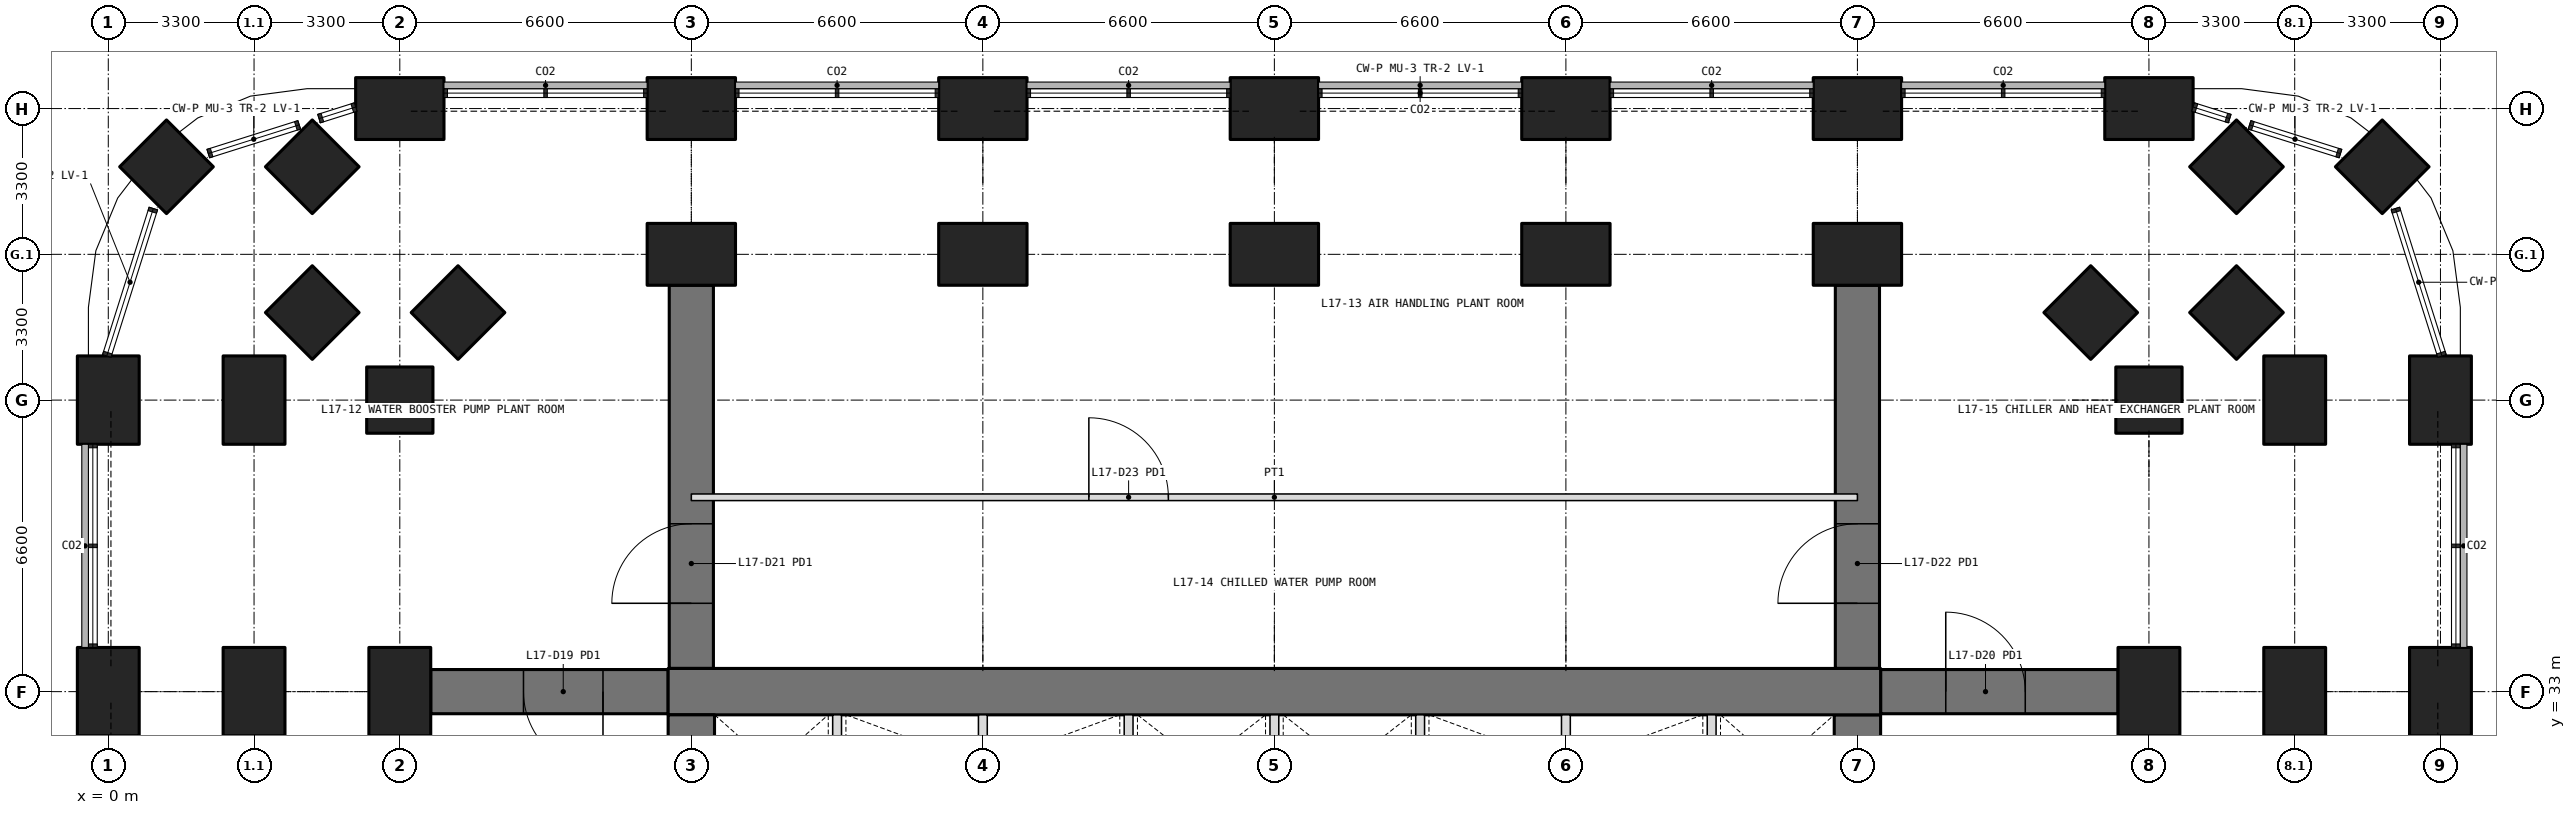
"""IFC4 building model, lengths in metres.
Left out: names, types, materials, properties, quantities, classifications, styles, units other than length and angle.
Written with IfcOpenShell. Run it as: python <this file> out.ifc"""

import sys

from ifc_helpers import new_model, si_unit, direction, frame, frame_2d, origin, origin_2d, place, context, subcontext, project, spatial, rectangle, extrude, element, fill, save


model = new_model("IFC4")
c1 = context("Model", 3, precision=1e-05, world=origin(), true_north=direction((0.0, 1.0)))
c2 = subcontext(c1, "Body", "Model", "MODEL_VIEW")
j1 = project(units=[si_unit("LENGTHUNIT", "METRE"), si_unit("PLANEANGLEUNIT", "RADIAN")], contexts=[c1])
p1 = place(None, origin())
s1 = spatial("IfcSite", under=j1, at=p1, CompositionType="ELEMENT")
p2 = place(p1, origin())
s2 = spatial("IfcBuilding", under=s1, at=p2, CompositionType="ELEMENT")
p3 = place(p2, frame((0.0, 0.0, 75.9)))
s3 = spatial("IfcBuildingStorey", under=s2, at=p3, CompositionType="ELEMENT", Elevation=75.9)
for number, where, z_axis, x_axis in (
    (1, (1.318, 44.882, 0.0), (0.0, 0.0, 1.0), (0.707, 0.707, 0.0)),
    (2, (51.482, 44.882, 0.0), (0.0, 0.0, 1.0), (0.707, 0.707, 0.0)),
):
    element("IfcColumn", number, at=place(p3, frame(where, z_axis=z_axis, x_axis=x_axis)), inside=s3, PredefinedType="COLUMN", context=c2, shape_type="SweptSolid", body=[
        extrude(rectangle(XDim=1.5, YDim=1.5, at=origin_2d()), origin(), (0.0, 0.0, 1.0), 6.3),
    ])
for number, where, z_axis, x_axis in (
    (3, (0.0, 33.0, 0.0), (0.0, 0.0, 1.0), (0.0, 1.0, 0.0)),
    (4, (52.8, 33.0, 0.0), (0.0, 0.0, 1.0), (0.0, 1.0, 0.0)),
    (5, (0.0, 39.6, 0.0), (0.0, 0.0, 1.0), (0.0, 1.0, 0.0)),
    (6, (52.8, 39.6, 0.0), (0.0, 0.0, 1.0), (0.0, 1.0, 0.0)),
    (7, (6.6, 46.2, 0.0), (0.0, 0.0, 1.0), (1.0, 0.0, 0.0)),
    (8, (13.2, 46.2, 0.0), (0.0, 0.0, 1.0), (1.0, 0.0, 0.0)),
    (9, (19.8, 46.2, 0.0), (0.0, 0.0, 1.0), (1.0, 0.0, 0.0)),
    (10, (26.4, 46.2, 0.0), (0.0, 0.0, 1.0), (1.0, 0.0, 0.0)),
    (11, (33.0, 46.2, 0.0), (0.0, 0.0, 1.0), (1.0, 0.0, 0.0)),
    (12, (39.6, 46.2, 0.0), (0.0, 0.0, 1.0), (1.0, 0.0, 0.0)),
    (13, (46.2, 46.2, 0.0), (0.0, 0.0, 1.0), (1.0, 0.0, 0.0)),
):
    element("IfcColumn", number, at=place(p3, frame(where, z_axis=z_axis, x_axis=x_axis)), inside=s3, PredefinedType="COLUMN", context=c2, shape_type="SweptSolid", body=[
        extrude(rectangle(XDim=2.0, YDim=1.4, at=origin_2d()), origin(), (0.0, 0.0, 1.0), 6.3),
    ])
for number, where, z_axis, x_axis in (
    (14, (6.6, 39.6, 0.0), (0.0, 0.0, 1.0), (1.0, 0.0, 0.0)),
    (15, (46.2, 39.6, 0.0), (0.0, 0.0, 1.0), (1.0, 0.0, 0.0)),
    (16, (4.618, 44.882, 0.0), (0.0, 0.0, 1.0), (0.707, 0.707, 0.0)),
    (17, (48.182, 44.882, 0.0), (0.0, 0.0, 1.0), (0.707, 0.707, 0.0)),
):
    element("IfcColumn", number, at=place(p3, frame(where, z_axis=z_axis, x_axis=x_axis)), inside=s3, PredefinedType="COLUMN", context=c2, shape_type="SweptSolid", body=[
        extrude(rectangle(XDim=1.5, YDim=1.5, at=origin_2d()), origin(), (0.0, 0.0, 1.0), 6.3),
    ])
for number, where, z_axis, x_axis in (
    (18, (3.3, 33.0, 0.0), (0.0, 0.0, 1.0), (0.0, 1.0, 0.0)),
    (19, (49.5, 33.0, 0.0), (0.0, 0.0, 1.0), (0.0, 1.0, 0.0)),
    (20, (3.3, 39.6, 0.0), (0.0, 0.0, 1.0), (0.0, 1.0, 0.0)),
    (21, (49.5, 39.6, 0.0), (0.0, 0.0, 1.0), (0.0, 1.0, 0.0)),
):
    element("IfcColumn", number, at=place(p3, frame(where, z_axis=z_axis, x_axis=x_axis)), inside=s3, PredefinedType="COLUMN", context=c2, shape_type="SweptSolid", body=[
        extrude(rectangle(XDim=2.0, YDim=1.4, at=origin_2d()), origin(), (0.0, 0.0, 1.0), 6.3),
    ])
for number, where, z_axis, x_axis in (
    (22, (4.618, 41.582, 0.0), (0.0, 0.0, 1.0), (0.707, 0.707, 0.0)),
    (23, (48.182, 41.582, 0.0), (0.0, 0.0, 1.0), (0.707, 0.707, 0.0)),
):
    element("IfcColumn", number, at=place(p3, frame(where, z_axis=z_axis, x_axis=x_axis)), inside=s3, PredefinedType="COLUMN", context=c2, shape_type="SweptSolid", body=[
        extrude(rectangle(XDim=1.5, YDim=1.5, at=origin_2d()), origin(), (0.0, 0.0, 1.0), 6.3),
    ])
for number, where, z_axis, x_axis in (
    (24, (13.2, 42.9, 0.0), (0.0, 0.0, 1.0), (1.0, 0.0, 0.0)),
    (25, (19.8, 42.9, 0.0), (0.0, 0.0, 1.0), (1.0, 0.0, 0.0)),
    (26, (26.4, 42.9, 0.0), (0.0, 0.0, 1.0), (1.0, 0.0, 0.0)),
    (27, (33.0, 42.9, 0.0), (0.0, 0.0, 1.0), (1.0, 0.0, 0.0)),
    (28, (39.6, 42.9, 0.0), (0.0, 0.0, 1.0), (1.0, 0.0, 0.0)),
):
    element("IfcColumn", number, at=place(p3, frame(where, z_axis=z_axis, x_axis=x_axis)), inside=s3, PredefinedType="COLUMN", context=c2, shape_type="SweptSolid", body=[
        extrude(rectangle(XDim=2.0, YDim=1.4, at=origin_2d()), origin(), (0.0, 0.0, 1.0), 6.3),
    ])
for number, where, z_axis, x_axis in (
    (29, (7.918, 41.582, 0.0), (0.0, 0.0, 1.0), (0.707, 0.707, 0.0)),
    (30, (44.882, 41.582, 0.0), (0.0, 0.0, 1.0), (0.707, 0.707, 0.0)),
):
    element("IfcColumn", number, at=place(p3, frame(where, z_axis=z_axis, x_axis=x_axis)), inside=s3, PredefinedType="COLUMN", context=c2, shape_type="SweptSolid", body=[
        extrude(rectangle(XDim=1.5, YDim=1.5, at=origin_2d()), origin(), (0.0, 0.0, 1.0), 6.3),
    ])
for number, where, z_axis, x_axis in (
    (31, (6.6, 33.0, 0.0), (0.0, 0.0, 1.0), (0.0, 1.0, 0.0)),
    (32, (46.2, 33.0, 0.0), (0.0, 0.0, 1.0), (0.0, 1.0, 0.0)),
):
    element("IfcColumn", number, at=place(p3, frame(where, z_axis=z_axis, x_axis=x_axis)), inside=s3, PredefinedType="COLUMN", context=c2, shape_type="SweptSolid", body=[
        extrude(rectangle(XDim=2.0, YDim=1.4, at=origin_2d()), origin(), (0.0, 0.0, 1.0), 6.3),
    ])
p4 = place(p3, frame((13.2, 33.525, 0.0), z_axis=(0.0, 0.0, 1.0), x_axis=(0.0, 1.0, 0.0)))
e33 = element("IfcWall", 33, at=p4, inside=s3, PredefinedType="SHEAR", context=c2, shape_type="SweptSolid", body=[
    extrude(rectangle(XDim=8.675, YDim=1.0, at=frame_2d((4.337, 0.0))), origin(), (0.0, 0.0, 1.0), 6.0),
])
p5 = place(p4, frame((1.475, 0.0, 0.0)))
e34 = element("IfcOpeningElement", 34, at=p5, cuts=e33, PredefinedType="OPENING", context=c2, shape_type="SweptSolid", body=[
    extrude(rectangle(XDim=1.8, YDim=2.4, at=frame_2d((0.9, 1.2))), frame((0.0, 0.51, 0.0), z_axis=(0.0, -1.0, 0.0), x_axis=(1.0, 0.0, 0.0)), (0.0, 0.0, 1.0), 1.02),
])
p6 = place(p3, frame((39.6, 33.525, 0.0), z_axis=(0.0, 0.0, 1.0), x_axis=(0.0, 1.0, 0.0)))
e35 = element("IfcWall", 35, at=p6, inside=s3, PredefinedType="SHEAR", context=c2, shape_type="SweptSolid", body=[
    extrude(rectangle(XDim=8.675, YDim=1.0, at=frame_2d((4.337, 0.0))), origin(), (0.0, 0.0, 1.0), 6.0),
])
p7 = place(p6, frame((1.475, 0.0, 0.0)))
e36 = element("IfcOpeningElement", 36, at=p7, cuts=e35, PredefinedType="OPENING", context=c2, shape_type="SweptSolid", body=[
    extrude(rectangle(XDim=1.8, YDim=2.4, at=frame_2d((0.9, 1.2))), frame((0.0, 0.51, 0.0), z_axis=(0.0, -1.0, 0.0), x_axis=(1.0, 0.0, 0.0)), (0.0, 0.0, 1.0), 1.02),
])
p8 = place(p3, frame((12.675, 33.0, 0.0), z_axis=(0.0, 0.0, 1.0), x_axis=(-1.0, 0.0, 0.0)))
e37 = element("IfcWall", 37, at=p8, inside=s3, PredefinedType="SHEAR", context=c2, shape_type="SweptSolid", body=[
    extrude(rectangle(XDim=5.375, YDim=1.0, at=frame_2d((2.688, 0.0))), origin(), (0.0, 0.0, 1.0), 6.0),
])
p9 = place(p8, frame((1.475, 0.0, 0.0)))
e38 = element("IfcOpeningElement", 38, at=p9, cuts=e37, PredefinedType="OPENING", context=c2, shape_type="SweptSolid", body=[
    extrude(rectangle(XDim=1.8, YDim=2.4, at=frame_2d((0.9, 1.2))), frame((0.0, 0.51, 0.0), z_axis=(0.0, -1.0, 0.0), x_axis=(1.0, 0.0, 0.0)), (0.0, 0.0, 1.0), 1.02),
])
p10 = place(p3, frame((40.125, 33.0, 0.0), z_axis=(0.0, 0.0, 1.0), x_axis=(1.0, 0.0, 0.0)))
e39 = element("IfcWall", 39, at=p10, inside=s3, PredefinedType="SHEAR", context=c2, shape_type="SweptSolid", body=[
    extrude(rectangle(XDim=5.375, YDim=1.0, at=frame_2d((2.688, 0.0))), origin(), (0.0, 0.0, 1.0), 6.0),
])
p11 = place(p10, frame((1.475, 0.0, 0.0)))
e40 = element("IfcOpeningElement", 40, at=p11, cuts=e39, PredefinedType="OPENING", context=c2, shape_type="SweptSolid", body=[
    extrude(rectangle(XDim=1.8, YDim=2.4, at=frame_2d((0.9, 1.2))), frame((0.0, 0.51, 0.0), z_axis=(0.0, -1.0, 0.0), x_axis=(1.0, 0.0, 0.0)), (0.0, 0.0, 1.0), 1.02),
])
p12 = place(p3, frame((39.6, 13.725, 0.0), z_axis=(0.0, 0.0, 1.0), x_axis=(0.0, 1.0, 0.0)))
e41 = element("IfcWall", 41, at=p12, inside=s3, PredefinedType="SHEAR", context=c2, shape_type="SweptSolid", body=[
    extrude(rectangle(XDim=18.75, YDim=1.05, at=frame_2d((9.375, 0.0))), origin(), (0.0, 0.0, 1.0), 6.3),
])
p13 = place(p12, frame((3.025, 0.0, 0.0)))
e42 = element("IfcOpeningElement", 42, at=p13, cuts=e41, PredefinedType="OPENING", context=c2, shape_type="SweptSolid", body=[
    extrude(rectangle(XDim=1.6, YDim=2.1, at=frame_2d((0.8, 1.05))), frame((0.0, 0.535, 0.0), z_axis=(0.0, -1.0, 0.0), x_axis=(1.0, 0.0, 0.0)), (0.0, 0.0, 1.0), 1.07),
])
p14 = place(p12, frame((13.825, 0.0, 0.0)))
e43 = element("IfcOpeningElement", 43, at=p14, cuts=e41, PredefinedType="OPENING", context=c2, shape_type="SweptSolid", body=[
    extrude(rectangle(XDim=1.6, YDim=2.1, at=frame_2d((0.8, 1.05))), frame((0.0, 0.535, 0.0), z_axis=(0.0, -1.0, 0.0), x_axis=(1.0, 0.0, 0.0)), (0.0, 0.0, 1.0), 1.07),
])
p15 = place(p3, frame((40.125, 33.0, 0.0), z_axis=(0.0, 0.0, 1.0), x_axis=(-1.0, 0.0, 0.0)))
e44 = element("IfcWall", 44, at=p15, inside=s3, PredefinedType="SHEAR", context=c2, shape_type="SweptSolid", body=[
    extrude(rectangle(XDim=27.45, YDim=1.05, at=frame_2d((13.725, 0.0))), origin(), (0.0, 0.0, 1.0), 6.3),
])
p16 = place(p3, frame((13.2, 32.475, 0.0), z_axis=(0.0, 0.0, 1.0), x_axis=(0.0, -1.0, 0.0)))
e45 = element("IfcWall", 45, at=p16, inside=s3, PredefinedType="SHEAR", context=c2, shape_type="SweptSolid", body=[
    extrude(rectangle(XDim=18.75, YDim=1.05, at=frame_2d((9.375, 0.0))), origin(), (0.0, 0.0, 1.0), 6.3),
])
p17 = place(p16, frame((14.125, 0.0, 0.0)))
e46 = element("IfcOpeningElement", 46, at=p17, cuts=e45, PredefinedType="OPENING", context=c2, shape_type="SweptSolid", body=[
    extrude(rectangle(XDim=1.6, YDim=2.1, at=frame_2d((0.8, 1.05))), frame((0.0, 0.535, 0.0), z_axis=(0.0, -1.0, 0.0), x_axis=(1.0, 0.0, 0.0)), (0.0, 0.0, 1.0), 1.07),
])
p18 = place(p16, frame((3.325, 0.0, 0.0)))
e47 = element("IfcOpeningElement", 47, at=p18, cuts=e45, PredefinedType="OPENING", context=c2, shape_type="SweptSolid", body=[
    extrude(rectangle(XDim=1.6, YDim=2.1, at=frame_2d((0.8, 1.05))), frame((0.0, 0.535, 0.0), z_axis=(0.0, -1.0, 0.0), x_axis=(1.0, 0.0, 0.0)), (0.0, 0.0, 1.0), 1.07),
])
for number, where, z_axis, x_axis in (
    (48, (16.5, 30.2, 0.0), (0.0, 0.0, 1.0), (0.0, 1.0, 0.0)),
    (49, (19.8, 30.2, 0.0), (0.0, 0.0, 1.0), (0.0, 1.0, 0.0)),
    (50, (23.1, 30.2, 0.0), (0.0, 0.0, 1.0), (0.0, 1.0, 0.0)),
    (51, (26.4, 30.2, 0.0), (0.0, 0.0, 1.0), (0.0, 1.0, 0.0)),
    (52, (29.7, 30.2, 0.0), (0.0, 0.0, 1.0), (0.0, 1.0, 0.0)),
    (53, (33.0, 30.2, 0.0), (0.0, 0.0, 1.0), (0.0, 1.0, 0.0)),
    (54, (36.3, 30.2, 0.0), (0.0, 0.0, 1.0), (0.0, 1.0, 0.0)),
):
    element("IfcWall", number, at=place(p3, frame(where, z_axis=z_axis, x_axis=x_axis)), inside=s3, PredefinedType="PARTITIONING", context=c2, shape_type="SweptSolid", body=[
        extrude(rectangle(XDim=2.275, YDim=0.2, at=frame_2d((1.138, 0.0))), origin(), (0.0, 0.0, 1.0), 6.3),
    ])
p19 = place(p3, frame((13.2, 37.4, 0.0), z_axis=(0.0, 0.0, 1.0), x_axis=(1.0, 0.0, 0.0)))
e55 = element("IfcWall", 55, at=p19, inside=s3, PredefinedType="PARTITIONING", context=c2, shape_type="SweptSolid", body=[
    extrude(rectangle(XDim=26.4, YDim=0.15, at=frame_2d((13.2, 0.0))), origin(), (0.0, 0.0, 1.0), 4.0),
])
p20 = place(p19, frame((9.0, 0.0, 0.0)))
e56 = element("IfcOpeningElement", 56, at=p20, cuts=e55, PredefinedType="OPENING", context=c2, shape_type="SweptSolid", body=[
    extrude(rectangle(XDim=1.8, YDim=2.4, at=frame_2d((0.9, 1.2))), frame((0.0, 0.085, 0.0), z_axis=(0.0, -1.0, 0.0), x_axis=(1.0, 0.0, 0.0)), (0.0, 0.0, 1.0), 0.17),
])
p21 = place(p20, origin())
e57 = element("IfcDoor", 57, at=p21, inside=s3, OperationType="DOUBLE_DOOR_SINGLE_SWING", PredefinedType="DOOR", context=c2, shape_type="SweptSolid", body=[
    extrude(rectangle(XDim=1.8, YDim=2.4, at=frame_2d((0.9, 1.2))), frame((0.0, 0.025, 0.0), z_axis=(0.0, -1.0, 0.0), x_axis=(1.0, 0.0, 0.0)), (0.0, 0.0, 1.0), 0.05),
])
fill(e56, e57)
p22 = place(p5, origin())
e58 = element("IfcDoor", 58, at=p22, inside=s3, OperationType="DOUBLE_DOOR_SINGLE_SWING", PredefinedType="DOOR", context=c2, shape_type="SweptSolid", body=[
    extrude(rectangle(XDim=1.8, YDim=2.4, at=frame_2d((0.9, 1.2))), frame((0.0, 0.025, 0.0), z_axis=(0.0, -1.0, 0.0), x_axis=(1.0, 0.0, 0.0)), (0.0, 0.0, 1.0), 0.05),
])
fill(e34, e58)
p23 = place(p7, origin())
e59 = element("IfcDoor", 59, at=p23, inside=s3, OperationType="DOUBLE_DOOR_SINGLE_SWING", PredefinedType="DOOR", context=c2, shape_type="SweptSolid", body=[
    extrude(rectangle(XDim=1.8, YDim=2.4, at=frame_2d((0.9, 1.2))), frame((0.0, 0.025, 0.0), z_axis=(0.0, -1.0, 0.0), x_axis=(1.0, 0.0, 0.0)), (0.0, 0.0, 1.0), 0.05),
])
fill(e36, e59)
p24 = place(p9, origin())
e60 = element("IfcDoor", 60, at=p24, inside=s3, OperationType="DOUBLE_DOOR_SINGLE_SWING", PredefinedType="DOOR", context=c2, shape_type="SweptSolid", body=[
    extrude(rectangle(XDim=1.8, YDim=2.4, at=frame_2d((0.9, 1.2))), frame((0.0, 0.025, 0.0), z_axis=(0.0, -1.0, 0.0), x_axis=(1.0, 0.0, 0.0)), (0.0, 0.0, 1.0), 0.05),
])
fill(e38, e60)
p25 = place(p11, origin())
e61 = element("IfcDoor", 61, at=p25, inside=s3, OperationType="DOUBLE_DOOR_SINGLE_SWING", PredefinedType="DOOR", context=c2, shape_type="SweptSolid", body=[
    extrude(rectangle(XDim=1.8, YDim=2.4, at=frame_2d((0.9, 1.2))), frame((0.0, 0.025, 0.0), z_axis=(0.0, -1.0, 0.0), x_axis=(1.0, 0.0, 0.0)), (0.0, 0.0, 1.0), 0.05),
])
fill(e40, e61)
save(model, sys.argv[1])
